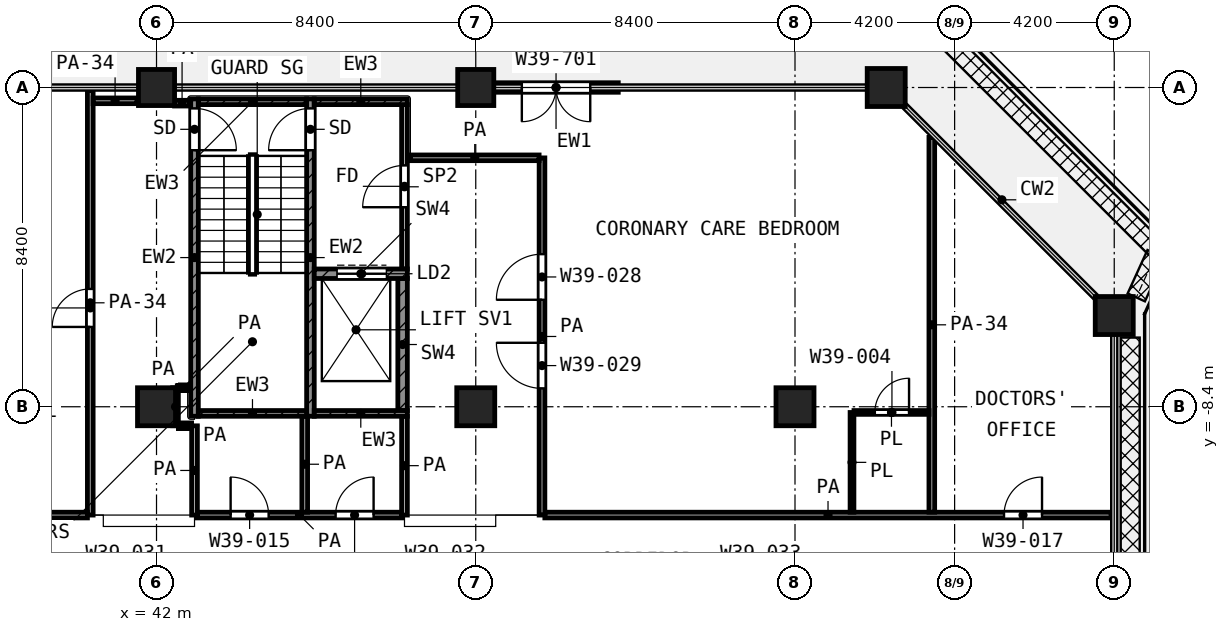
"""IFC4 building model, lengths in metres.
Left out: names, types, materials, properties, quantities, classifications, styles, units other than length and angle.
Written with IfcOpenShell. Run it as: python <this file> out.ifc"""

import sys

from ifc_helpers import new_model, si_unit, direction, frame, frame_2d, origin, origin_2d, place, context, subcontext, project, spatial, rectangle, extrude, element, fill, save


model = new_model("IFC4")
c1 = context("Model", 3, precision=1e-05, world=origin(), true_north=direction((0.0, 1.0)))
c2 = subcontext(c1, "Body", "Model", "MODEL_VIEW")
j1 = project(units=[si_unit("LENGTHUNIT", "METRE"), si_unit("PLANEANGLEUNIT", "RADIAN")], contexts=[c1])
p1 = place(None, origin())
s1 = spatial("IfcSite", under=j1, at=p1, CompositionType="ELEMENT")
p2 = place(p1, origin())
s2 = spatial("IfcBuilding", under=s1, at=p2, CompositionType="ELEMENT")
p3 = place(p2, frame((0.0, 0.0, 192.0)))
s3 = spatial("IfcBuildingStorey", under=s2, at=p3, CompositionType="ELEMENT", Elevation=192.0)
for number, where, z_axis, x_axis in (
    (1, (42.0, 0.0, 0.0), (0.0, 0.0, 1.0), (1.0, 0.0, 0.0)),
    (2, (50.4, 0.0, 0.0), (0.0, 0.0, 1.0), (1.0, 0.0, 0.0)),
):
    element("IfcColumn", number, at=place(p3, frame(where, z_axis=z_axis, x_axis=x_axis)), inside=s3, PredefinedType="COLUMN", context=c2, shape_type="SweptSolid", body=[
        extrude(rectangle(XDim=0.95, YDim=0.95, at=origin_2d()), origin(), (0.0, 0.0, 1.0), 4.2),
    ])
for number, where, z_axis, x_axis in (
    (3, (61.2, 0.0, 0.0), (0.0, 0.0, 1.0), (1.0, 0.0, 0.0)),
    (4, (67.2, -6.0, 0.0), (0.0, 0.0, 1.0), (1.0, 0.0, 0.0)),
    (5, (42.0, -8.4, 0.0), (0.0, 0.0, 1.0), (1.0, 0.0, 0.0)),
    (6, (50.4, -8.4, 0.0), (0.0, 0.0, 1.0), (1.0, 0.0, 0.0)),
    (7, (58.8, -8.4, 0.0), (0.0, 0.0, 1.0), (1.0, 0.0, 0.0)),
):
    element("IfcColumn", number, at=place(p3, frame(where, z_axis=z_axis, x_axis=x_axis)), inside=s3, PredefinedType="COLUMN", context=c2, shape_type="SweptSolid", body=[
        extrude(rectangle(XDim=1.0, YDim=1.0, at=origin_2d()), origin(), (0.0, 0.0, 1.0), 4.2),
    ])
p4 = place(p3, frame((54.15, 0.0, 0.0), z_axis=(0.0, 0.0, 1.0), x_axis=(-1.0, 0.0, 0.0)))
e8 = element("IfcWall", 8, at=p4, inside=s3, PredefinedType="SOLIDWALL", context=c2, shape_type="SweptSolid", body=[
    extrude(rectangle(XDim=3.275, YDim=0.25, at=frame_2d((1.637, 0.0))), origin(), (0.0, 0.0, 1.0), 2.58),
])
p5 = place(p4, frame((0.738, 0.0, 0.0)))
e9 = element("IfcOpeningElement", 9, at=p5, cuts=e8, PredefinedType="OPENING", context=c2, shape_type="SweptSolid", body=[
    extrude(rectangle(XDim=1.8, YDim=2.1, at=frame_2d((0.9, 1.05))), frame((0.0, 0.135, 0.0), z_axis=(0.0, -1.0, 0.0), x_axis=(1.0, 0.0, 0.0)), (0.0, 0.0, 1.0), 0.27),
])
p6 = place(p3, frame((43.0, -8.65, 0.0), z_axis=(0.0, 0.0, 1.0), x_axis=(0.0, 1.0, 0.0)))
e10 = element("IfcWall", 10, at=p6, inside=s3, PredefinedType="SHEAR", context=c2, shape_type="SweptSolid", body=[
    extrude(rectangle(XDim=8.35, YDim=0.2, at=frame_2d((4.175, 0.0))), origin(), (0.0, 0.0, 1.0), 3.6),
])
p7 = place(p6, frame((7.0, 0.0, 0.0)))
e11 = element("IfcOpeningElement", 11, at=p7, cuts=e10, PredefinedType="OPENING", context=c2, shape_type="SweptSolid", body=[
    extrude(rectangle(XDim=1.1, YDim=2.1, at=frame_2d((0.55, 1.05))), frame((0.0, 0.11, 0.0), z_axis=(0.0, -1.0, 0.0), x_axis=(1.0, 0.0, 0.0)), (0.0, 0.0, 1.0), 0.22),
])
p8 = place(p3, frame((46.05, -8.65, 0.0), z_axis=(0.0, 0.0, 1.0), x_axis=(0.0, 1.0, 0.0)))
e12 = element("IfcWall", 12, at=p8, inside=s3, PredefinedType="SHEAR", context=c2, shape_type="SweptSolid", body=[
    extrude(rectangle(XDim=8.35, YDim=0.2, at=frame_2d((4.175, 0.0))), origin(), (0.0, 0.0, 1.0), 3.6),
])
p9 = place(p8, frame((7.0, 0.0, 0.0)))
e13 = element("IfcOpeningElement", 13, at=p9, cuts=e12, PredefinedType="OPENING", context=c2, shape_type="SweptSolid", body=[
    extrude(rectangle(XDim=1.1, YDim=2.1, at=frame_2d((0.55, 1.05))), frame((0.0, 0.11, 0.0), z_axis=(0.0, -1.0, 0.0), x_axis=(1.0, 0.0, 0.0)), (0.0, 0.0, 1.0), 0.22),
])
p10 = place(p3, frame((43.1, -0.375, 0.0), z_axis=(0.0, 0.0, 1.0), x_axis=(1.0, 0.0, 0.0)))
e14 = element("IfcWall", 14, at=p10, inside=s3, PredefinedType="SHEAR", context=c2, shape_type="SweptSolid", body=[
    extrude(rectangle(XDim=2.85, YDim=0.15, at=frame_2d((1.425, 0.0))), origin(), (0.0, 0.0, 1.0), 3.6),
])
p11 = place(p3, frame((46.15, -0.375, 0.0), z_axis=(0.0, 0.0, 1.0), x_axis=(1.0, 0.0, 0.0)))
e15 = element("IfcWall", 15, at=p11, inside=s3, PredefinedType="SHEAR", context=c2, shape_type="SweptSolid", body=[
    extrude(rectangle(XDim=2.45, YDim=0.15, at=frame_2d((1.225, 0.0))), origin(), (0.0, 0.0, 1.0), 3.6),
])
p12 = place(p3, frame((43.1, -8.575, 0.0), z_axis=(0.0, 0.0, 1.0), x_axis=(1.0, 0.0, 0.0)))
e16 = element("IfcWall", 16, at=p12, inside=s3, PredefinedType="SHEAR", context=c2, shape_type="SweptSolid", body=[
    extrude(rectangle(XDim=2.85, YDim=0.15, at=frame_2d((1.425, 0.0))), origin(), (0.0, 0.0, 1.0), 3.6),
])
p13 = place(p3, frame((46.15, -8.575, 0.0), z_axis=(0.0, 0.0, 1.0), x_axis=(1.0, 0.0, 0.0)))
e17 = element("IfcWall", 17, at=p13, inside=s3, PredefinedType="SHEAR", context=c2, shape_type="SweptSolid", body=[
    extrude(rectangle(XDim=2.45, YDim=0.15, at=frame_2d((1.225, 0.0))), origin(), (0.0, 0.0, 1.0), 3.6),
])
p14 = place(p3, frame((46.15, -4.9, 0.0), z_axis=(0.0, 0.0, 1.0), x_axis=(1.0, 0.0, 0.0)))
e18 = element("IfcWall", 18, at=p14, inside=s3, PredefinedType="SHEAR", context=c2, shape_type="SweptSolid", body=[
    extrude(rectangle(XDim=2.45, YDim=0.25, at=frame_2d((1.225, 0.0))), origin(), (0.0, 0.0, 1.0), 3.6),
])
p15 = place(p14, frame((0.6, 0.0, 0.0)))
e19 = element("IfcOpeningElement", 19, at=p15, cuts=e18, PredefinedType="OPENING", context=c2, shape_type="SweptSolid", body=[
    extrude(rectangle(XDim=1.3, YDim=2.1, at=frame_2d((0.65, 1.05))), frame((0.0, 0.135, 0.0), z_axis=(0.0, -1.0, 0.0), x_axis=(1.0, 0.0, 0.0)), (0.0, 0.0, 1.0), 0.27),
])
p16 = place(p3, frame((48.475, -8.5, 0.0), z_axis=(0.0, 0.0, 1.0), x_axis=(0.0, 1.0, 0.0)))
e20 = element("IfcWall", 20, at=p16, inside=s3, PredefinedType="SHEAR", context=c2, shape_type="SweptSolid", body=[
    extrude(rectangle(XDim=3.475, YDim=0.25, at=frame_2d((1.738, 0.0))), origin(), (0.0, 0.0, 1.0), 3.6),
])
p17 = place(p3, frame((48.525, -4.775, 0.0), z_axis=(0.0, 0.0, 1.0), x_axis=(0.0, 1.0, 0.0)))
e21 = element("IfcWall", 21, at=p17, inside=s3, PredefinedType="PARTITIONING", context=c2, shape_type="SweptSolid", body=[
    extrude(rectangle(XDim=4.325, YDim=0.15, at=frame_2d((2.163, 0.0))), origin(), (0.0, 0.0, 1.0), 3.6),
])
p18 = place(p17, frame((1.625, 0.0, 0.0)))
e22 = element("IfcOpeningElement", 22, at=p18, cuts=e21, PredefinedType="OPENING", context=c2, shape_type="SweptSolid", body=[
    extrude(rectangle(XDim=1.1, YDim=2.1, at=frame_2d((0.55, 1.05))), frame((0.0, 0.085, 0.0), z_axis=(0.0, -1.0, 0.0), x_axis=(1.0, 0.0, 0.0)), (0.0, 0.0, 1.0), 0.17),
])
p19 = place(p3, frame((60.352, -8.55, 0.0), z_axis=(0.0, 0.0, 1.0), x_axis=(1.0, 0.0, 0.0)))
e23 = element("IfcWall", 23, at=p19, inside=s3, PredefinedType="PARTITIONING", context=c2, shape_type="SweptSolid", body=[
    extrude(rectangle(XDim=1.973, YDim=0.1, at=frame_2d((0.986, 0.0))), origin(), (0.0, 0.0, 1.0), 3.6),
])
p20 = place(p19, frame((0.549, 0.0, 0.0)))
e24 = element("IfcOpeningElement", 24, at=p20, cuts=e23, PredefinedType="OPENING", context=c2, shape_type="SweptSolid", body=[
    extrude(rectangle(XDim=0.9, YDim=2.1, at=frame_2d((0.45, 1.05))), frame((0.0, 0.06, 0.0), z_axis=(0.0, -1.0, 0.0), x_axis=(1.0, 0.0, 0.0)), (0.0, 0.0, 1.0), 0.12),
])
p21 = place(p3, frame((60.3, -11.175, 0.0), z_axis=(0.0, 0.0, 1.0), x_axis=(0.0, 1.0, 0.0)))
e25 = element("IfcWall", 25, at=p21, inside=s3, PredefinedType="PARTITIONING", context=c2, shape_type="SweptSolid", body=[
    extrude(rectangle(XDim=2.624, YDim=0.1, at=frame_2d((1.312, 0.0))), origin(), (0.0, 0.0, 1.0), 3.6),
])
p22 = place(p3, frame((29.4, -11.25, 0.0), z_axis=(0.0, 0.0, 1.0), x_axis=(1.0, 0.0, 0.0)))
e26 = element("IfcWall", 26, at=p22, inside=s3, PredefinedType="PARTITIONING", context=c2, shape_type="SweptSolid", body=[
    extrude(rectangle(XDim=10.782, YDim=0.15, at=frame_2d((5.391, 0.0))), origin(), (0.0, 0.0, 1.0), 3.6),
])
p23 = place(p22, frame((4.5, 0.0, 0.0)))
e27 = element("IfcOpeningElement", 27, at=p23, cuts=e26, PredefinedType="OPENING", context=c2, shape_type="SweptSolid", body=[
    extrude(rectangle(XDim=1.2, YDim=2.1, at=frame_2d((0.6, 1.05))), frame((0.0, 0.085, 0.0), z_axis=(0.0, -1.0, 0.0), x_axis=(1.0, 0.0, 0.0)), (0.0, 0.0, 1.0), 0.17),
])
p24 = place(p22, frame((1.5, 0.0, 0.0)))
e28 = element("IfcOpeningElement", 28, at=p24, cuts=e26, PredefinedType="OPENING", context=c2, shape_type="SweptSolid", body=[
    extrude(rectangle(XDim=1.2, YDim=2.1, at=frame_2d((0.6, 1.05))), frame((0.0, 0.085, 0.0), z_axis=(0.0, -1.0, 0.0), x_axis=(1.0, 0.0, 0.0)), (0.0, 0.0, 1.0), 0.17),
])
p25 = place(p3, frame((43.075, -11.25, 0.0), z_axis=(0.0, 0.0, 1.0), x_axis=(1.0, 0.0, 0.0)))
e29 = element("IfcWall", 29, at=p25, inside=s3, PredefinedType="PARTITIONING", context=c2, shape_type="SweptSolid", body=[
    extrude(rectangle(XDim=5.375, YDim=0.15, at=frame_2d((2.688, 0.0))), origin(), (0.0, 0.0, 1.0), 3.6),
])
p26 = place(p25, frame((0.875, 0.0, 0.0)))
e30 = element("IfcOpeningElement", 30, at=p26, cuts=e29, PredefinedType="OPENING", context=c2, shape_type="SweptSolid", body=[
    extrude(rectangle(XDim=1.0, YDim=2.1, at=frame_2d((0.5, 1.05))), frame((0.0, 0.085, 0.0), z_axis=(0.0, -1.0, 0.0), x_axis=(1.0, 0.0, 0.0)), (0.0, 0.0, 1.0), 0.17),
])
p27 = place(p25, frame((3.637, 0.0, 0.0)))
e31 = element("IfcOpeningElement", 31, at=p27, cuts=e29, PredefinedType="OPENING", context=c2, shape_type="SweptSolid", body=[
    extrude(rectangle(XDim=1.0, YDim=2.1, at=frame_2d((0.5, 1.05))), frame((0.0, 0.085, 0.0), z_axis=(0.0, -1.0, 0.0), x_axis=(1.0, 0.0, 0.0)), (0.0, 0.0, 1.0), 0.17),
])
p28 = place(p3, frame((52.218, -11.25, 0.0), z_axis=(0.0, 0.0, 1.0), x_axis=(1.0, 0.0, 0.0)))
e32 = element("IfcWall", 32, at=p28, inside=s3, PredefinedType="PARTITIONING", context=c2, shape_type="SweptSolid", body=[
    extrude(rectangle(XDim=14.902, YDim=0.15, at=frame_2d((7.451, 0.0))), origin(), (0.0, 0.0, 1.0), 3.6),
])
p29 = place(p28, frame((12.082, 0.0, 0.0)))
e33 = element("IfcOpeningElement", 33, at=p29, cuts=e32, PredefinedType="OPENING", context=c2, shape_type="SweptSolid", body=[
    extrude(rectangle(XDim=1.0, YDim=2.1, at=frame_2d((0.5, 1.05))), frame((0.0, 0.085, 0.0), z_axis=(0.0, -1.0, 0.0), x_axis=(1.0, 0.0, 0.0)), (0.0, 0.0, 1.0), 0.17),
])
p30 = place(p3, frame((42.576, -8.9, 0.0), z_axis=(0.0, 0.0, 1.0), x_axis=(1.0, 0.0, 0.0)))
e34 = element("IfcWall", 34, at=p30, inside=s3, PredefinedType="PARTITIONING", context=c2, shape_type="SweptSolid", body=[
    extrude(rectangle(XDim=0.347, YDim=0.15, at=frame_2d((0.174, 0.0))), origin(), (0.0, 0.0, 1.0), 3.6),
])
p31 = place(p3, frame((42.576, -7.9, 0.0), z_axis=(0.0, 0.0, 1.0), x_axis=(1.0, 0.0, 0.0)))
e35 = element("IfcWall", 35, at=p31, inside=s3, PredefinedType="PARTITIONING", context=c2, shape_type="SweptSolid", body=[
    extrude(rectangle(XDim=0.244, YDim=0.15, at=frame_2d((0.122, 0.0))), origin(), (0.0, 0.0, 1.0), 3.6),
])
p32 = place(p3, frame((48.68, -1.85, 0.0), z_axis=(0.0, 0.0, 1.0), x_axis=(1.0, 0.0, 0.0)))
e36 = element("IfcWall", 36, at=p32, inside=s3, PredefinedType="PARTITIONING", context=c2, shape_type="SweptSolid", body=[
    extrude(rectangle(XDim=3.387, YDim=0.15, at=frame_2d((1.693, 0.0))), origin(), (0.0, 0.0, 1.0), 3.6),
])
p33 = place(p3, frame((42.475, -0.412, 0.0), z_axis=(0.0, 0.0, 1.0), x_axis=(1.0, 0.0, 0.0)))
e37 = element("IfcWall", 37, at=p33, inside=s3, PredefinedType="PARTITIONING", context=c2, shape_type="SweptSolid", body=[
    extrude(rectangle(XDim=0.395, YDim=0.15, at=frame_2d((0.198, 0.0))), origin(), (0.0, 0.0, 1.0), 3.6),
])
p34 = place(p3, frame((40.332, -0.35, 0.0), z_axis=(0.0, 0.0, 1.0), x_axis=(1.0, 0.0, 0.0)))
e38 = element("IfcWall", 38, at=p34, inside=s3, PredefinedType="PARTITIONING", context=c2, shape_type="SweptSolid", body=[
    extrude(rectangle(XDim=1.156, YDim=0.15, at=frame_2d((0.578, 0.0))), origin(), (0.0, 0.0, 1.0), 2.7),
])
p35 = place(p3, frame((40.257, -11.25, 0.0), z_axis=(0.0, 0.0, 1.0), x_axis=(0.0, 1.0, 0.0)))
e39 = element("IfcWall", 39, at=p35, inside=s3, PredefinedType="PARTITIONING", context=c2, shape_type="SweptSolid", body=[
    extrude(rectangle(XDim=11.17, YDim=0.15, at=frame_2d((5.585, 0.0))), origin(), (0.0, 0.0, 1.0), 2.7),
])
p36 = place(p35, frame((4.95, 0.0, 0.0)))
e40 = element("IfcOpeningElement", 40, at=p36, cuts=e39, PredefinedType="OPENING", context=c2, shape_type="SweptSolid", body=[
    extrude(rectangle(XDim=1.0, YDim=2.1, at=frame_2d((0.5, 1.05))), frame((0.0, 0.085, 0.0), z_axis=(0.0, -1.0, 0.0), x_axis=(1.0, 0.0, 0.0)), (0.0, 0.0, 1.0), 0.17),
])
p37 = place(p3, frame((42.5, -8.899, 0.0), z_axis=(0.0, 0.0, 1.0), x_axis=(0.0, 1.0, 0.0)))
e41 = element("IfcWall", 41, at=p37, inside=s3, PredefinedType="PARTITIONING", context=c2, shape_type="SweptSolid", body=[
    extrude(rectangle(XDim=0.998, YDim=0.15, at=frame_2d((0.499, 0.0))), origin(), (0.0, 0.0, 1.0), 3.6),
])
p38 = place(p3, frame((43.0, -11.25, 0.0), z_axis=(0.0, 0.0, 1.0), x_axis=(0.0, 1.0, 0.0)))
e42 = element("IfcWall", 42, at=p38, inside=s3, PredefinedType="PARTITIONING", context=c2, shape_type="SweptSolid", body=[
    extrude(rectangle(XDim=2.348, YDim=0.15, at=frame_2d((1.174, 0.0))), origin(), (0.0, 0.0, 1.0), 3.6),
])
p39 = place(p3, frame((45.9, -11.175, 0.0), z_axis=(0.0, 0.0, 1.0), x_axis=(0.0, 1.0, 0.0)))
e43 = element("IfcWall", 43, at=p39, inside=s3, PredefinedType="PARTITIONING", context=c2, shape_type="SweptSolid", body=[
    extrude(rectangle(XDim=2.525, YDim=0.15, at=frame_2d((1.263, 0.0))), origin(), (0.0, 0.0, 1.0), 3.6),
])
p40 = place(p3, frame((48.525, -11.25, 0.0), z_axis=(0.0, 0.0, 1.0), x_axis=(0.0, 1.0, 0.0)))
e44 = element("IfcWall", 44, at=p40, inside=s3, PredefinedType="PARTITIONING", context=c2, shape_type="SweptSolid", body=[
    extrude(rectangle(XDim=2.6, YDim=0.15, at=frame_2d((1.3, 0.0))), origin(), (0.0, 0.0, 1.0), 3.6),
])
p41 = place(p3, frame((52.143, -11.25, 0.0), z_axis=(0.0, 0.0, 1.0), x_axis=(0.0, 1.0, 0.0)))
e45 = element("IfcWall", 45, at=p41, inside=s3, PredefinedType="PARTITIONING", context=c2, shape_type="SweptSolid", body=[
    extrude(rectangle(XDim=9.398, YDim=0.15, at=frame_2d((4.699, 0.0))), origin(), (0.0, 0.0, 1.0), 3.6),
])
p42 = place(p41, frame((5.665, 0.0, 0.0)))
e46 = element("IfcOpeningElement", 46, at=p42, cuts=e45, PredefinedType="OPENING", context=c2, shape_type="SweptSolid", body=[
    extrude(rectangle(XDim=1.2, YDim=2.1, at=frame_2d((0.6, 1.05))), frame((0.0, 0.085, 0.0), z_axis=(0.0, -1.0, 0.0), x_axis=(1.0, 0.0, 0.0)), (0.0, 0.0, 1.0), 0.17),
])
p43 = place(p41, frame((3.333, 0.0, 0.0)))
e47 = element("IfcOpeningElement", 47, at=p43, cuts=e45, PredefinedType="OPENING", context=c2, shape_type="SweptSolid", body=[
    extrude(rectangle(XDim=1.2, YDim=2.1, at=frame_2d((0.6, 1.05))), frame((0.0, 0.085, 0.0), z_axis=(0.0, -1.0, 0.0), x_axis=(1.0, 0.0, 0.0)), (0.0, 0.0, 1.0), 0.17),
])
p44 = place(p3, frame((62.4, -11.175, 0.0), z_axis=(0.0, 0.0, 1.0), x_axis=(0.0, 1.0, 0.0)))
e48 = element("IfcWall", 48, at=p44, inside=s3, PredefinedType="PARTITIONING", context=c2, shape_type="SweptSolid", body=[
    extrude(rectangle(XDim=9.862, YDim=0.15, at=frame_2d((4.931, 0.0))), origin(), (0.0, 0.0, 1.0), 2.7),
])
p45 = place(p5, origin())
e49 = element("IfcDoor", 49, at=p45, inside=s3, OperationType="DOUBLE_DOOR_SINGLE_SWING", PredefinedType="DOOR", context=c2, shape_type="SweptSolid", body=[
    extrude(rectangle(XDim=1.8, YDim=2.1, at=frame_2d((0.9, 1.05))), frame((0.0, 0.025, 0.0), z_axis=(0.0, -1.0, 0.0), x_axis=(1.0, 0.0, 0.0)), (0.0, 0.0, 1.0), 0.05),
])
fill(e9, e49)
p46 = place(p7, frame((1.1, 0.0, 0.0), z_axis=(0.0, 0.0, 1.0), x_axis=(-1.0, 0.0, 0.0)))
e50 = element("IfcDoor", 50, at=p46, inside=s3, OperationType="SINGLE_SWING_LEFT", PredefinedType="DOOR", context=c2, shape_type="SweptSolid", body=[
    extrude(rectangle(XDim=1.1, YDim=2.1, at=frame_2d((0.55, 1.05))), frame((0.0, 0.025, 0.0), z_axis=(0.0, -1.0, 0.0), x_axis=(1.0, 0.0, 0.0)), (0.0, 0.0, 1.0), 0.05),
])
fill(e11, e50)
p47 = place(p9, origin())
e51 = element("IfcDoor", 51, at=p47, inside=s3, OperationType="SINGLE_SWING_LEFT", PredefinedType="DOOR", context=c2, shape_type="SweptSolid", body=[
    extrude(rectangle(XDim=1.1, YDim=2.1, at=frame_2d((0.55, 1.05))), frame((0.0, 0.025, 0.0), z_axis=(0.0, -1.0, 0.0), x_axis=(1.0, 0.0, 0.0)), (0.0, 0.0, 1.0), 0.05),
])
fill(e13, e51)
p48 = place(p15, origin())
e52 = element("IfcDoor", 52, at=p48, inside=s3, OperationType="DOUBLE_DOOR_SLIDING", PredefinedType="DOOR", context=c2, shape_type="SweptSolid", body=[
    extrude(rectangle(XDim=1.3, YDim=2.1, at=frame_2d((0.65, 1.05))), frame((0.0, 0.025, 0.0), z_axis=(0.0, -1.0, 0.0), x_axis=(1.0, 0.0, 0.0)), (0.0, 0.0, 1.0), 0.05),
])
fill(e19, e52)
p49 = place(p18, origin())
e53 = element("IfcDoor", 53, at=p49, inside=s3, OperationType="SINGLE_SWING_LEFT", PredefinedType="DOOR", context=c2, shape_type="SweptSolid", body=[
    extrude(rectangle(XDim=1.1, YDim=2.1, at=frame_2d((0.55, 1.05))), frame((0.0, 0.025, 0.0), z_axis=(0.0, -1.0, 0.0), x_axis=(1.0, 0.0, 0.0)), (0.0, 0.0, 1.0), 0.05),
])
fill(e22, e53)
p50 = place(p36, origin())
e54 = element("IfcDoor", 54, at=p50, inside=s3, OperationType="SINGLE_SWING_LEFT", PredefinedType="DOOR", context=c2, shape_type="SweptSolid", body=[
    extrude(rectangle(XDim=1.0, YDim=2.1, at=frame_2d((0.5, 1.05))), frame((0.0, 0.025, 0.0), z_axis=(0.0, -1.0, 0.0), x_axis=(1.0, 0.0, 0.0)), (0.0, 0.0, 1.0), 0.05),
])
fill(e40, e54)
p51 = place(p26, origin())
e55 = element("IfcDoor", 55, at=p51, inside=s3, OperationType="SINGLE_SWING_LEFT", PredefinedType="DOOR", context=c2, shape_type="SweptSolid", body=[
    extrude(rectangle(XDim=1.0, YDim=2.1, at=frame_2d((0.5, 1.05))), frame((0.0, 0.025, 0.0), z_axis=(0.0, -1.0, 0.0), x_axis=(1.0, 0.0, 0.0)), (0.0, 0.0, 1.0), 0.05),
])
fill(e30, e55)
p52 = place(p27, origin())
e56 = element("IfcDoor", 56, at=p52, inside=s3, OperationType="SINGLE_SWING_RIGHT", PredefinedType="DOOR", context=c2, shape_type="SweptSolid", body=[
    extrude(rectangle(XDim=1.0, YDim=2.1, at=frame_2d((0.5, 1.05))), frame((0.0, 0.025, 0.0), z_axis=(0.0, -1.0, 0.0), x_axis=(1.0, 0.0, 0.0)), (0.0, 0.0, 1.0), 0.05),
])
fill(e31, e56)
p53 = place(p42, origin())
e57 = element("IfcDoor", 57, at=p53, inside=s3, OperationType="SINGLE_SWING_LEFT", PredefinedType="DOOR", context=c2, shape_type="SweptSolid", body=[
    extrude(rectangle(XDim=1.2, YDim=2.1, at=frame_2d((0.6, 1.05))), frame((0.0, 0.025, 0.0), z_axis=(0.0, -1.0, 0.0), x_axis=(1.0, 0.0, 0.0)), (0.0, 0.0, 1.0), 0.05),
])
fill(e46, e57)
p54 = place(p43, origin())
e58 = element("IfcDoor", 58, at=p54, inside=s3, OperationType="SINGLE_SWING_RIGHT", PredefinedType="DOOR", context=c2, shape_type="SweptSolid", body=[
    extrude(rectangle(XDim=1.2, YDim=2.1, at=frame_2d((0.6, 1.05))), frame((0.0, 0.025, 0.0), z_axis=(0.0, -1.0, 0.0), x_axis=(1.0, 0.0, 0.0)), (0.0, 0.0, 1.0), 0.05),
])
fill(e47, e58)
p55 = place(p20, origin())
e59 = element("IfcDoor", 59, at=p55, inside=s3, OperationType="SINGLE_SWING_RIGHT", PredefinedType="DOOR", context=c2, shape_type="SweptSolid", body=[
    extrude(rectangle(XDim=0.9, YDim=2.1, at=frame_2d((0.45, 1.05))), frame((0.0, 0.025, 0.0), z_axis=(0.0, -1.0, 0.0), x_axis=(1.0, 0.0, 0.0)), (0.0, 0.0, 1.0), 0.05),
])
fill(e24, e59)
p56 = place(p29, origin())
e60 = element("IfcDoor", 60, at=p56, inside=s3, OperationType="SINGLE_SWING_RIGHT", PredefinedType="DOOR", context=c2, shape_type="SweptSolid", body=[
    extrude(rectangle(XDim=1.0, YDim=2.1, at=frame_2d((0.5, 1.05))), frame((0.0, 0.025, 0.0), z_axis=(0.0, -1.0, 0.0), x_axis=(1.0, 0.0, 0.0)), (0.0, 0.0, 1.0), 0.05),
])
fill(e33, e60)
save(model, sys.argv[1])
